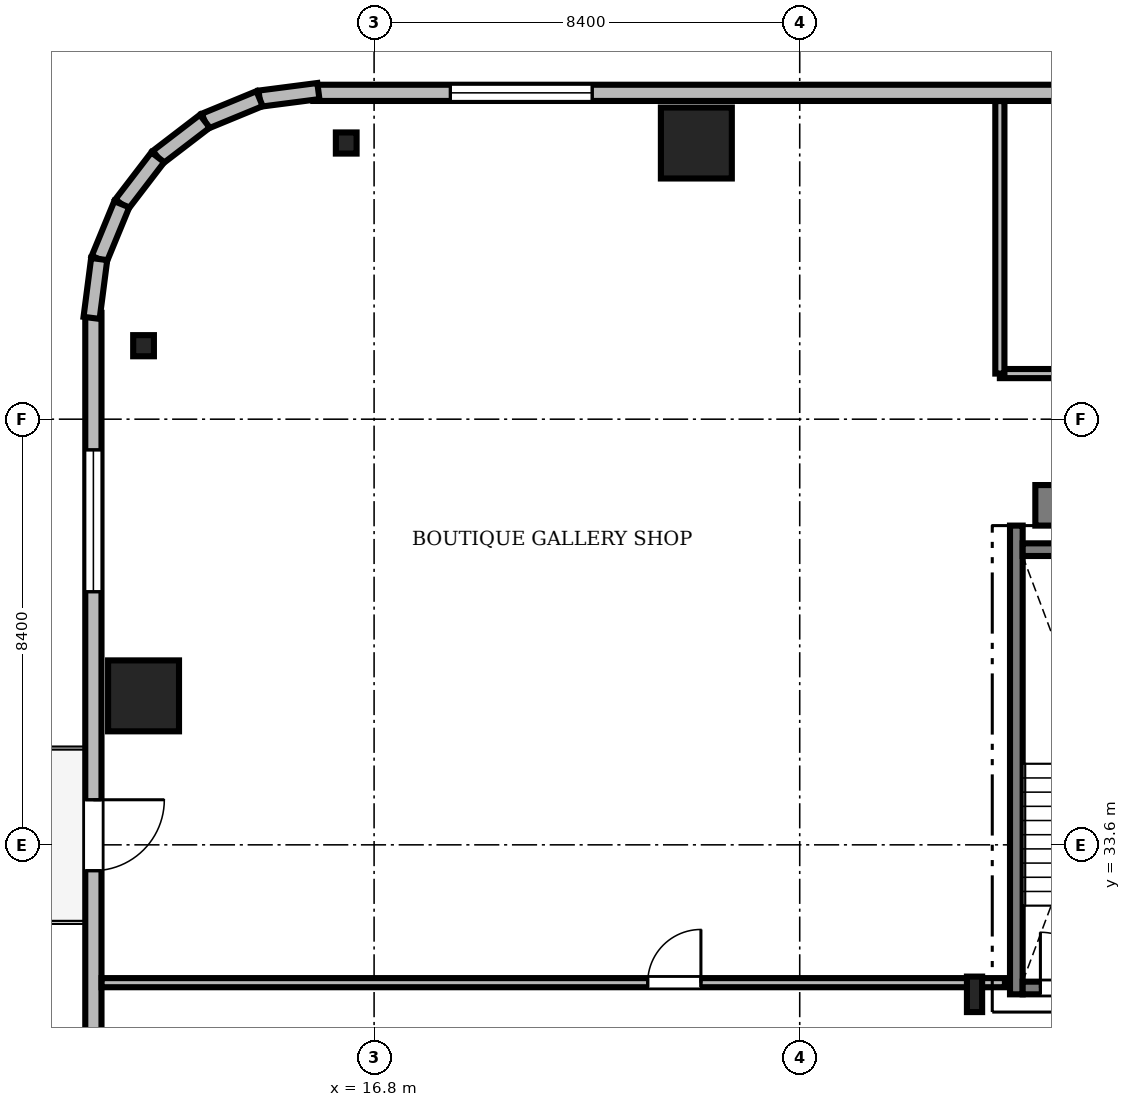
"""IFC4 building model, lengths in metres.
Left out: names, types, materials, properties, quantities, classifications, styles, units other than length and angle.
Written with IfcOpenShell. Run it as: python <this file> out.ifc"""

import sys

from ifc_helpers import new_model, si_unit, direction, frame, frame_2d, origin, origin_2d, place, context, subcontext, project, spatial, rectangle, i_section, extrude, source, transform, mapped, element, fill, save


model = new_model("IFC4")
c1 = context("Model", 3, precision=1e-05, world=origin(), true_north=direction((0.0, 1.0)))
c2 = subcontext(c1, "Body", "Model", "MODEL_VIEW")
j1 = project(units=[si_unit("LENGTHUNIT", "METRE"), si_unit("PLANEANGLEUNIT", "RADIAN")], contexts=[c1])
p1 = place(None, origin())
s1 = spatial("IfcSite", under=j1, at=p1, CompositionType="ELEMENT")
p2 = place(p1, origin())
s2 = spatial("IfcBuilding", under=s1, at=p2, CompositionType="ELEMENT")
p3 = place(p2, frame((0.0, 0.0, 196.05)))
s3 = spatial("IfcBuildingStorey", under=s2, at=p3, CompositionType="ELEMENT", Elevation=196.05)
m1 = source(origin(), c2, "Body", "SweptSolid", [
    extrude(rectangle(XDim=17.52, YDim=0.8, at=frame_2d((8.76, 0.0))), origin(), (0.0, 0.0, 1.0), 3.53),
])
p4 = place(p3, frame((29.85, 40.3, 0.0), z_axis=(0.0, 0.0, 1.0), x_axis=(1.0, 0.0, 0.0)))
e1 = element("IfcWall", 1, at=p4, inside=s3, PredefinedType="SHEAR", context=c2, shape_type="MappedRepresentation", body=[
    mapped(m1, transform((0.0, 0.0, 0.0), scale=1.0)),
])
m2 = source(origin(), c2, "Body", "SweptSolid", [
    extrude(i_section(OverallWidth=0.3, OverallDepth=0.7, WebThickness=0.017, FlangeThickness=0.032, FilletRadius=0.027, at=origin_2d()), origin(), (0.0, 0.0, 1.0), 3.53),
])
p5 = place(p3, frame((28.65, 30.65, 0.0), z_axis=(0.0, 0.0, 1.0), x_axis=(1.0, 0.0, 0.0)))
e2 = element("IfcColumn", 2, at=p5, inside=s3, PredefinedType="COLUMN", context=c2, shape_type="MappedRepresentation", body=[
    mapped(m2, transform((0.0, 0.0, 0.0), scale=1.0)),
])
m3 = source(origin(), c2, "Body", "SweptSolid", [
    extrude(rectangle(XDim=1.4, YDim=1.4, at=origin_2d()), origin(), (0.0, 0.0, 1.0), 3.53),
])
for number, where, z_axis, x_axis in (
    (3, (23.16, 47.45, 0.0), (0.0, 0.0, 1.0), (1.0, 0.0, 0.0)),
    (4, (12.25, 36.54, 0.0), (0.0, 0.0, 1.0), (1.0, 0.0, 0.0)),
):
    element("IfcColumn", number, at=place(p3, frame(where, z_axis=z_axis, x_axis=x_axis)), inside=s3, PredefinedType="COLUMN", context=c2, shape_type="MappedRepresentation", body=[
        mapped(m3, transform((0.0, 0.0, 0.0), scale=1.0)),
    ])
m4 = source(origin(), c2, "Body", "SweptSolid", [
    extrude(i_section(OverallWidth=0.409, OverallDepth=0.417, WebThickness=0.021, FlangeThickness=0.033, FilletRadius=0.015, at=origin_2d()), origin(), (0.0, 0.0, 1.0), 3.53),
])
for number, where, z_axis, x_axis in (
    (5, (16.25, 47.45, 0.0), (0.0, 0.0, 1.0), (1.0, 0.0, 0.0)),
    (6, (12.25, 43.45, 0.0), (0.0, 0.0, 1.0), (1.0, 0.0, 0.0)),
):
    element("IfcColumn", number, at=place(p3, frame(where, z_axis=z_axis, x_axis=x_axis)), inside=s3, PredefinedType="COLUMN", context=c2, shape_type="MappedRepresentation", body=[
        mapped(m4, transform((0.0, 0.0, 0.0), scale=1.0)),
    ])
m5 = source(origin(), c2, "Body", "SweptSolid", [
    extrude(rectangle(XDim=15.6, YDim=0.32, at=frame_2d((7.8, 0.0))), origin(), (0.0, 0.0, 1.0), 3.53),
])
p6 = place(p3, frame((31.2, 48.44, 0.0), z_axis=(0.0, 0.0, 1.0), x_axis=(-1.0, 0.0, 0.0)))
e7 = element("IfcWall", 7, at=p6, inside=s3, PredefinedType="SOLIDWALL", context=c2, shape_type="MappedRepresentation", body=[
    mapped(m5, transform((0.0, 0.0, 0.0), scale=1.0)),
])
m6 = source(origin(), c2, "Body", "SweptSolid", [
    extrude(rectangle(XDim=2.8, YDim=2.4, at=frame_2d((1.4, 1.2))), frame((0.0, 0.17, 0.0), z_axis=(0.0, -1.0, 0.0), x_axis=(1.0, 0.0, 0.0)), (0.0, 0.0, 1.0), 0.34),
])
p7 = place(p6, frame((10.095, 0.0, 0.72)))
e8 = element("IfcOpeningElement", 8, at=p7, cuts=e7, PredefinedType="OPENING", context=c2, shape_type="MappedRepresentation", body=[
    mapped(m6, transform((0.0, 0.0, 0.0), scale=1.0)),
])
m7 = source(origin(), c2, "Body", "SweptSolid", [
    extrude(rectangle(XDim=15.6, YDim=0.32, at=frame_2d((7.8, 0.0))), origin(), (0.0, 0.0, 1.0), 3.53),
])
p8 = place(p3, frame((11.26, 44.1, 0.0), z_axis=(0.0, 0.0, 1.0), x_axis=(0.0, -1.0, 0.0)))
e9 = element("IfcWall", 9, at=p8, inside=s3, PredefinedType="SOLIDWALL", context=c2, shape_type="MappedRepresentation", body=[
    mapped(m7, transform((0.0, 0.0, 0.0), scale=1.0)),
])
m8 = source(origin(), c2, "Body", "SweptSolid", [
    extrude(rectangle(XDim=1.4, YDim=2.3, at=frame_2d((0.7, 1.15))), frame((0.0, 0.17, 0.0), z_axis=(0.0, -1.0, 0.0), x_axis=(1.0, 0.0, 0.0)), (0.0, 0.0, 1.0), 0.34),
])
p9 = place(p8, frame((9.61, 0.0, 0.0)))
e10 = element("IfcOpeningElement", 10, at=p9, cuts=e9, PredefinedType="OPENING", context=c2, shape_type="MappedRepresentation", body=[
    mapped(m8, transform((0.0, 0.0, 0.0), scale=1.0)),
])
p10 = place(p8, frame((2.705, 0.0, 0.72)))
e11 = element("IfcOpeningElement", 11, at=p10, cuts=e9, PredefinedType="OPENING", context=c2, shape_type="MappedRepresentation", body=[
    mapped(m6, transform((0.0, 0.0, 0.0), scale=1.0)),
])
m9 = source(origin(), c2, "Body", "SweptSolid", [
    extrude(rectangle(XDim=1.17, YDim=0.32, at=frame_2d((0.585, 0.0))), origin(), (0.0, 0.0, 1.0), 3.53),
])
p11 = place(p3, frame((15.7, 48.476, 0.0), z_axis=(0.0, 0.0, 1.0), x_axis=(-0.991735963317, -0.128295670475, 0.0)))
e12 = element("IfcWall", 12, at=p11, inside=s3, PredefinedType="SOLIDWALL", context=c2, shape_type="MappedRepresentation", body=[
    mapped(m9, transform((0.0, 0.0, 0.0), scale=1.0)),
])
m10 = source(origin(), c2, "Body", "SweptSolid", [
    extrude(rectangle(XDim=1.169, YDim=0.32, at=frame_2d((0.584, 0.0))), origin(), (0.0, 0.0, 1.0), 3.53),
])
p12 = place(p3, frame((14.54, 48.325, 0.0), z_axis=(0.0, 0.0, 1.0), x_axis=(-0.924552646638, -0.381054331552, 0.0)))
e13 = element("IfcWall", 13, at=p12, inside=s3, PredefinedType="SOLIDWALL", context=c2, shape_type="MappedRepresentation", body=[
    mapped(m10, transform((0.0, 0.0, 0.0), scale=1.0)),
])
m11 = source(origin(), c2, "Body", "SweptSolid", [
    extrude(rectangle(XDim=1.169, YDim=0.32, at=frame_2d((0.584, 0.0))), origin(), (0.0, 0.0, 1.0), 3.53),
])
p13 = place(p3, frame((13.459, 47.88, 0.0), z_axis=(0.0, 0.0, 1.0), x_axis=(-0.793663520347, -0.608356981114, 0.0)))
e14 = element("IfcWall", 14, at=p13, inside=s3, PredefinedType="SOLIDWALL", context=c2, shape_type="MappedRepresentation", body=[
    mapped(m11, transform((0.0, 0.0, 0.0), scale=1.0)),
])
m12 = source(origin(), c2, "Body", "SweptSolid", [
    extrude(rectangle(XDim=1.169, YDim=0.32, at=frame_2d((0.584, 0.0))), origin(), (0.0, 0.0, 1.0), 3.53),
])
p14 = place(p3, frame((12.531, 47.169, 0.0), z_axis=(0.0, 0.0, 1.0), x_axis=(-0.608387696831, -0.793639975269, 0.0)))
e15 = element("IfcWall", 15, at=p14, inside=s3, PredefinedType="SOLIDWALL", context=c2, shape_type="MappedRepresentation", body=[
    mapped(m12, transform((0.0, 0.0, 0.0), scale=1.0)),
])
p15 = place(p3, frame((11.82, 46.241, 0.0), z_axis=(0.0, 0.0, 1.0), x_axis=(-0.381054331552, -0.924552646638, 0.0)))
e16 = element("IfcWall", 16, at=p15, inside=s3, PredefinedType="SOLIDWALL", context=c2, shape_type="MappedRepresentation", body=[
    mapped(m10, transform((0.0, 0.0, 0.0), scale=1.0)),
])
p16 = place(p3, frame((11.375, 45.16, 0.0), z_axis=(0.0, 0.0, 1.0), x_axis=(-0.128295670475, -0.991735963317, 0.0)))
e17 = element("IfcWall", 17, at=p16, inside=s3, PredefinedType="SOLIDWALL", context=c2, shape_type="MappedRepresentation", body=[
    mapped(m9, transform((0.0, 0.0, 0.0), scale=1.0)),
])
m13 = source(origin(), c2, "Body", "SweptSolid", [
    extrude(rectangle(XDim=9.25, YDim=0.25, at=frame_2d((4.625, 0.0))), origin(), (0.0, 0.0, 1.0), 3.55),
])
p17 = place(p3, frame((29.475, 30.65, 0.0), z_axis=(0.0, 0.0, 1.0), x_axis=(0.0, 1.0, 0.0)))
e18 = element("IfcWall", 18, at=p17, inside=s3, PredefinedType="SOLIDWALL", context=c2, shape_type="MappedRepresentation", body=[
    mapped(m13, transform((0.0, 0.0, 0.0), scale=1.0)),
])
m14 = source(origin(), c2, "Body", "SweptSolid", [
    extrude(rectangle(XDim=3.15, YDim=0.25, at=frame_2d((1.575, 0.0))), origin(), (0.0, 0.0, 1.0), 3.55),
])
p18 = place(p3, frame((29.6, 39.425, 0.0), z_axis=(0.0, 0.0, 1.0), x_axis=(1.0, 0.0, 0.0)))
e19 = element("IfcWall", 19, at=p18, inside=s3, PredefinedType="SOLIDWALL", context=c2, shape_type="MappedRepresentation", body=[
    mapped(m14, transform((0.0, 0.0, 0.0), scale=1.0)),
])
p19 = place(p3, frame((29.6, 30.775, 0.0), z_axis=(0.0, 0.0, 1.0), x_axis=(1.0, 0.0, 0.0)))
e20 = element("IfcWall", 20, at=p19, inside=s3, PredefinedType="SOLIDWALL", context=c2, shape_type="MappedRepresentation", body=[
    mapped(m14, transform((0.0, 0.0, 0.0), scale=1.0)),
])
m15 = source(origin(), c2, "Body", "SweptSolid", [
    extrude(rectangle(XDim=1.1, YDim=2.2, at=frame_2d((0.55, 1.1))), frame((0.0, 0.135, 0.0), z_axis=(0.0, -1.0, 0.0), x_axis=(1.0, 0.0, 0.0)), (0.0, 0.0, 1.0), 0.27),
])
p20 = place(p19, frame((0.35, 0.0, 0.0)))
e21 = element("IfcOpeningElement", 21, at=p20, cuts=e20, PredefinedType="OPENING", context=c2, shape_type="MappedRepresentation", body=[
    mapped(m15, transform((0.0, 0.0, 0.0), scale=1.0)),
])
m16 = source(origin(), c2, "Body", "SweptSolid", [
    extrude(rectangle(XDim=28.428, YDim=0.18, at=frame_2d((14.214, 0.0))), origin(), (0.0, 0.0, 1.0), 2.772),
])
p21 = place(p3, frame((29.15, 42.9, 0.0), z_axis=(0.0, 0.0, 1.0), x_axis=(1.0, 0.0, 0.0)))
e22 = element("IfcWall", 22, at=p21, inside=s3, PredefinedType="PARTITIONING", context=c2, shape_type="MappedRepresentation", body=[
    mapped(m16, transform((0.0, 0.0, 0.0), scale=1.0)),
])
m17 = source(origin(), c2, "Body", "SweptSolid", [
    extrude(rectangle(XDim=1.05, YDim=2.2, at=frame_2d((0.525, 1.1))), frame((0.0, 0.1, 0.0), z_axis=(0.0, -1.0, 0.0), x_axis=(1.0, 0.0, 0.0)), (0.0, 0.0, 1.0), 0.2),
])
p22 = place(p21, frame((4.5, 0.0, 0.0)))
e23 = element("IfcOpeningElement", 23, at=p22, cuts=e22, PredefinedType="OPENING", context=c2, shape_type="MappedRepresentation", body=[
    mapped(m17, transform((0.0, 0.0, 0.0), scale=1.0)),
])
m18 = source(origin(), c2, "Body", "SweptSolid", [
    extrude(rectangle(XDim=17.828, YDim=0.18, at=frame_2d((8.914, 0.0))), origin(), (0.0, 0.0, 1.0), 2.772),
])
p23 = place(p3, frame((11.422, 30.88, 0.0), z_axis=(0.0, 0.0, 1.0), x_axis=(1.0, 0.0, 0.0)))
e24 = element("IfcWall", 24, at=p23, inside=s3, PredefinedType="PARTITIONING", context=c2, shape_type="MappedRepresentation", body=[
    mapped(m18, transform((0.0, 0.0, 0.0), scale=1.0)),
])
p24 = place(p23, frame((10.778, 0.0, 0.0)))
e25 = element("IfcOpeningElement", 25, at=p24, cuts=e24, PredefinedType="OPENING", context=c2, shape_type="MappedRepresentation", body=[
    mapped(m17, transform((0.0, 0.0, 0.0), scale=1.0)),
])
m19 = source(origin(), c2, "Body", "SweptSolid", [
    extrude(rectangle(XDim=5.378, YDim=0.18, at=frame_2d((2.689, 0.0))), origin(), (0.0, 0.0, 1.0), 2.772),
])
p25 = place(p3, frame((29.15, 42.9, 0.0), z_axis=(0.0, 0.0, 1.0), x_axis=(0.0, 1.0, 0.0)))
e26 = element("IfcWall", 26, at=p25, inside=s3, PredefinedType="PARTITIONING", context=c2, shape_type="MappedRepresentation", body=[
    mapped(m19, transform((0.0, 0.0, 0.0), scale=1.0)),
])
m20 = source(origin(), c2, "Body", "SweptSolid", [
    extrude(rectangle(XDim=2.8, YDim=2.4, at=frame_2d((1.4, 1.2))), frame((0.0, 0.03, 0.0), z_axis=(0.0, -1.0, 0.0), x_axis=(1.0, 0.0, 0.0)), (0.0, 0.0, 1.0), 0.06),
])
p26 = place(p7, origin())
e27 = element("IfcWindow", 27, at=p26, inside=s3, PartitioningType="SINGLE_PANEL", PredefinedType="WINDOW", context=c2, shape_type="MappedRepresentation", body=[
    mapped(m20, transform((0.0, 0.0, 0.0), scale=1.0)),
])
fill(e8, e27)
m21 = source(origin(), c2, "Body", "SweptSolid", [
    extrude(rectangle(XDim=1.4, YDim=2.3, at=frame_2d((0.7, 1.15))), frame((0.0, 0.025, 0.0), z_axis=(0.0, -1.0, 0.0), x_axis=(1.0, 0.0, 0.0)), (0.0, 0.0, 1.0), 0.05),
])
p27 = place(p9, frame((1.4, 0.0, 0.0), z_axis=(0.0, 0.0, 1.0), x_axis=(-1.0, 0.0, 0.0)))
e28 = element("IfcDoor", 28, at=p27, inside=s3, OperationType="DOUBLE_DOOR_SLIDING", PredefinedType="DOOR", context=c2, shape_type="MappedRepresentation", body=[
    mapped(m21, transform((0.0, 0.0, 0.0), scale=1.0)),
])
fill(e10, e28)
p28 = place(p10, origin())
e29 = element("IfcWindow", 29, at=p28, inside=s3, PartitioningType="SINGLE_PANEL", PredefinedType="WINDOW", context=c2, shape_type="MappedRepresentation", body=[
    mapped(m20, transform((0.0, 0.0, 0.0), scale=1.0)),
])
fill(e11, e29)
m22 = source(origin(), c2, "Body", "SweptSolid", [
    extrude(rectangle(XDim=1.1, YDim=2.2, at=frame_2d((0.55, 1.1))), frame((0.0, 0.025, 0.0), z_axis=(0.0, -1.0, 0.0), x_axis=(1.0, 0.0, 0.0)), (0.0, 0.0, 1.0), 0.05),
])
p29 = place(p20, origin())
e30 = element("IfcDoor", 30, at=p29, inside=s3, OperationType="SINGLE_SWING_LEFT", PredefinedType="DOOR", context=c2, shape_type="MappedRepresentation", body=[
    mapped(m22, transform((0.0, 0.0, 0.0), scale=1.0)),
])
fill(e21, e30)
m23 = source(origin(), c2, "Body", "SweptSolid", [
    extrude(rectangle(XDim=1.05, YDim=2.2, at=frame_2d((0.525, 1.1))), frame((0.0, 0.025, 0.0), z_axis=(0.0, -1.0, 0.0), x_axis=(1.0, 0.0, 0.0)), (0.0, 0.0, 1.0), 0.05),
])
p30 = place(p24, origin())
e31 = element("IfcDoor", 31, at=p30, inside=s3, OperationType="SINGLE_SWING_RIGHT", PredefinedType="DOOR", context=c2, shape_type="MappedRepresentation", body=[
    mapped(m23, transform((0.0, 0.0, 0.0), scale=1.0)),
])
fill(e25, e31)
save(model, sys.argv[1])
